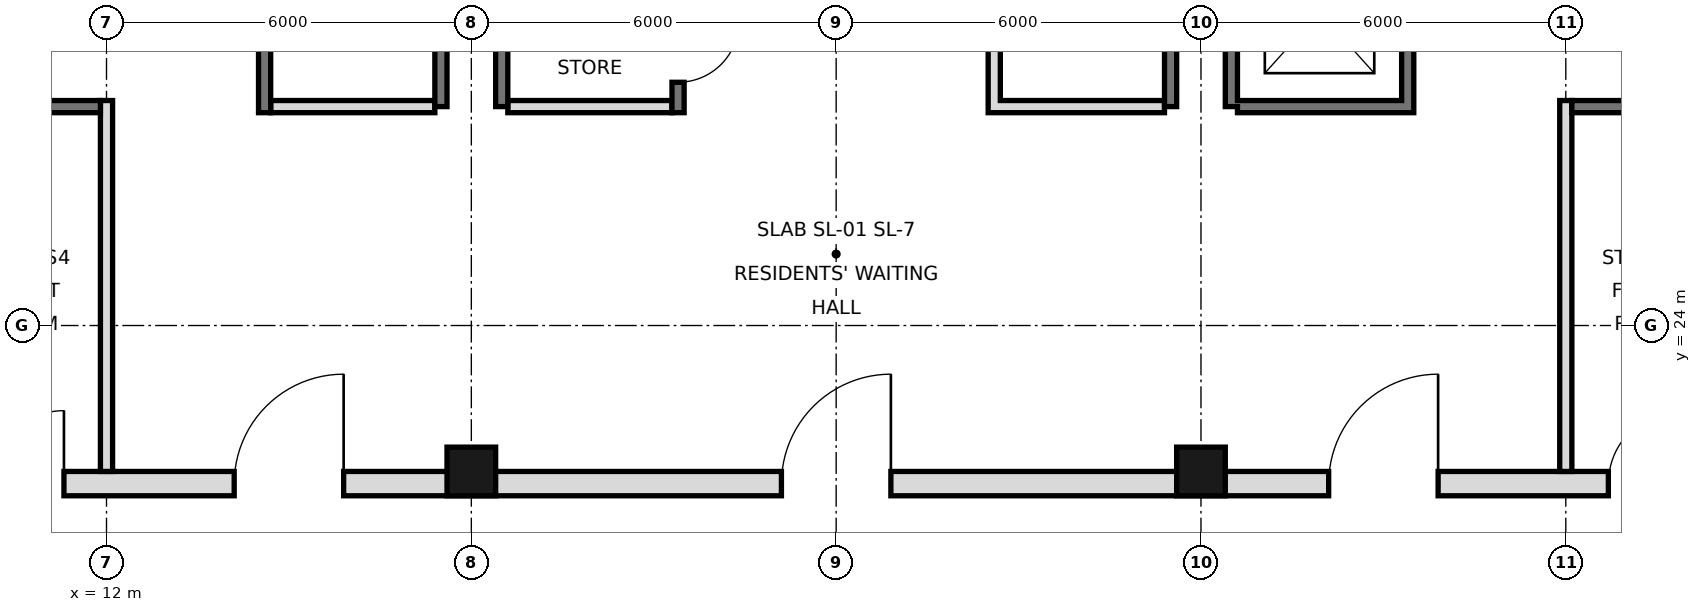
"""IFC4 building model, lengths in metres.
Left out: names, types, materials, properties, quantities, classifications, styles, units other than length and angle.
Written with IfcOpenShell. Run it as: python <this file> out.ifc"""

import sys

from ifc_helpers import new_model, si_unit, direction, frame, frame_2d, origin, origin_2d, place, context, subcontext, project, spatial, rectangle, hollow_rectangle, extrude, element, fill, save


model = new_model("IFC4")
c1 = context("Model", 3, precision=1e-05, world=origin(), true_north=direction((0.0, 1.0)))
c2 = subcontext(c1, "Body", "Model", "MODEL_VIEW")
j1 = project(units=[si_unit("LENGTHUNIT", "METRE"), si_unit("PLANEANGLEUNIT", "RADIAN")], contexts=[c1])
p1 = place(None, origin())
s1 = spatial("IfcSite", under=j1, at=p1, CompositionType="ELEMENT")
p2 = place(p1, origin())
s2 = spatial("IfcBuilding", under=s1, at=p2, CompositionType="ELEMENT")
p3 = place(p2, frame((0.0, 0.0, 263.0)))
s3 = spatial("IfcBuildingStorey", under=s2, at=p3, CompositionType="ELEMENT", Elevation=263.0)
for number, where, z_axis, x_axis in (
    (1, (18.0, 21.6, 0.0), (0.0, 0.0, 1.0), (1.0, 0.0, 0.0)),
    (2, (30.0, 21.6, 0.0), (0.0, 0.0, 1.0), (1.0, 0.0, 0.0)),
):
    element("IfcColumn", number, at=place(p3, frame(where, z_axis=z_axis, x_axis=x_axis)), inside=s3, PredefinedType="COLUMN", context=c2, shape_type="SweptSolid", body=[
        extrude(hollow_rectangle(XDim=0.8, YDim=0.8, WallThickness=0.032, at=origin_2d()), origin(), (0.0, 0.0, 1.0), 3.6),
    ])
for number, where, z_axis, x_axis in (
    (3, (17.5, 27.6, 0.0), (0.0, 0.0, 1.0), (0.0, 1.0, 0.0)),
    (4, (18.5, 27.6, 0.0), (0.0, 0.0, 1.0), (0.0, 1.0, 0.0)),
    (5, (29.5, 27.6, 0.0), (0.0, 0.0, 1.0), (0.0, 1.0, 0.0)),
    (6, (30.5, 27.6, 0.0), (0.0, 0.0, 1.0), (0.0, 1.0, 0.0)),
):
    element("IfcWall", number, at=place(p3, frame(where, z_axis=z_axis, x_axis=x_axis)), inside=s3, PredefinedType="SOLIDWALL", context=c2, shape_type="SweptSolid", body=[
        extrude(rectangle(XDim=17.5, YDim=0.2, at=frame_2d((8.75, 0.0))), origin(), (0.0, 0.0, 1.0), 3.42),
    ])
p4 = place(p3, frame((5.6, 21.4, 0.0), z_axis=(0.0, 0.0, 1.0), x_axis=(1.0, 0.0, 0.0)))
e7 = element("IfcWall", 7, at=p4, inside=s3, PredefinedType="SOLIDWALL", context=c2, shape_type="SweptSolid", body=[
    extrude(rectangle(XDim=36.8, YDim=0.4, at=frame_2d((18.4, 0.0))), origin(), (0.0, 0.0, 1.0), 3.42),
])
p5 = place(p4, frame((8.5, 0.0, 0.0)))
e8 = element("IfcOpeningElement", 8, at=p5, cuts=e7, PredefinedType="OPENING", context=c2, shape_type="SweptSolid", body=[
    extrude(rectangle(XDim=1.8, YDim=2.1, at=frame_2d((0.9, 1.05))), frame((0.0, 0.21, 0.0), z_axis=(0.0, -1.0, 0.0), x_axis=(1.0, 0.0, 0.0)), (0.0, 0.0, 1.0), 0.42),
])
p6 = place(p4, frame((17.5, 0.0, 0.0)))
e9 = element("IfcOpeningElement", 9, at=p6, cuts=e7, PredefinedType="OPENING", context=c2, shape_type="SweptSolid", body=[
    extrude(rectangle(XDim=1.8, YDim=2.1, at=frame_2d((0.9, 1.05))), frame((0.0, 0.21, 0.0), z_axis=(0.0, -1.0, 0.0), x_axis=(1.0, 0.0, 0.0)), (0.0, 0.0, 1.0), 0.42),
])
p7 = place(p4, frame((26.5, 0.0, 0.0)))
e10 = element("IfcOpeningElement", 10, at=p7, cuts=e7, PredefinedType="OPENING", context=c2, shape_type="SweptSolid", body=[
    extrude(rectangle(XDim=1.8, YDim=2.1, at=frame_2d((0.9, 1.05))), frame((0.0, 0.21, 0.0), z_axis=(0.0, -1.0, 0.0), x_axis=(1.0, 0.0, 0.0)), (0.0, 0.0, 1.0), 0.42),
])
p8 = place(p4, frame((4.5, 0.0, 0.0)))
e11 = element("IfcOpeningElement", 11, at=p8, cuts=e7, PredefinedType="OPENING", context=c2, shape_type="SweptSolid", body=[
    extrude(rectangle(XDim=1.2, YDim=2.1, at=frame_2d((0.6, 1.05))), frame((0.0, 0.21, 0.0), z_axis=(0.0, -1.0, 0.0), x_axis=(1.0, 0.0, 0.0)), (0.0, 0.0, 1.0), 0.42),
])
p9 = place(p4, frame((31.1, 0.0, 0.0)))
e12 = element("IfcOpeningElement", 12, at=p9, cuts=e7, PredefinedType="OPENING", context=c2, shape_type="SweptSolid", body=[
    extrude(rectangle(XDim=1.2, YDim=2.1, at=frame_2d((0.6, 1.05))), frame((0.0, 0.21, 0.0), z_axis=(0.0, -1.0, 0.0), x_axis=(1.0, 0.0, 0.0)), (0.0, 0.0, 1.0), 0.42),
])
p10 = place(p3, frame((12.0, 21.6, 0.0), z_axis=(0.0, 0.0, 1.0), x_axis=(0.0, 1.0, 0.0)))
e13 = element("IfcWall", 13, at=p10, inside=s3, PredefinedType="PARTITIONING", context=c2, shape_type="SweptSolid", body=[
    extrude(rectangle(XDim=6.1, YDim=0.2, at=frame_2d((3.05, 0.0))), origin(), (0.0, 0.0, 1.0), 3.42),
])
p11 = place(p3, frame((14.6, 27.5, 0.0), z_axis=(0.0, 0.0, 1.0), x_axis=(0.0, 1.0, 0.0)))
e14 = element("IfcWall", 14, at=p11, inside=s3, PredefinedType="SOLIDWALL", context=c2, shape_type="SweptSolid", body=[
    extrude(rectangle(XDim=17.5, YDim=0.2, at=frame_2d((8.75, 0.0))), origin(), (0.0, 0.0, 1.0), 3.42),
])
p12 = place(p11, frame((15.4, 0.0, 0.0)))
e15 = element("IfcOpeningElement", 15, at=p12, cuts=e14, PredefinedType="OPENING", context=c2, shape_type="SweptSolid", body=[
    extrude(rectangle(XDim=1.1, YDim=2.1, at=frame_2d((0.55, 1.05))), frame((0.0, 0.11, 0.0), z_axis=(0.0, -1.0, 0.0), x_axis=(1.0, 0.0, 0.0)), (0.0, 0.0, 1.0), 0.22),
])
p13 = place(p11, frame((2.7, 0.0, 0.0)))
e16 = element("IfcOpeningElement", 16, at=p13, cuts=e14, PredefinedType="OPENING", context=c2, shape_type="SweptSolid", body=[
    extrude(rectangle(XDim=1.0, YDim=2.1, at=frame_2d((0.5, 1.05))), frame((0.0, 0.11, 0.0), z_axis=(0.0, -1.0, 0.0), x_axis=(1.0, 0.0, 0.0)), (0.0, 0.0, 1.0), 0.22),
])
p14 = place(p11, frame((9.9, 0.0, 0.0)))
e17 = element("IfcOpeningElement", 17, at=p14, cuts=e14, PredefinedType="OPENING", context=c2, shape_type="SweptSolid", body=[
    extrude(rectangle(XDim=0.9, YDim=2.1, at=frame_2d((0.45, 1.05))), frame((0.0, 0.11, 0.0), z_axis=(0.0, -1.0, 0.0), x_axis=(1.0, 0.0, 0.0)), (0.0, 0.0, 1.0), 0.22),
])
p15 = place(p3, frame((21.4, 27.5, 0.0), z_axis=(0.0, 0.0, 1.0), x_axis=(0.0, 1.0, 0.0)))
e18 = element("IfcWall", 18, at=p15, inside=s3, PredefinedType="SOLIDWALL", context=c2, shape_type="SweptSolid", body=[
    extrude(rectangle(XDim=17.5, YDim=0.2, at=frame_2d((8.75, 0.0))), origin(), (0.0, 0.0, 1.0), 3.42),
])
p16 = place(p15, frame((0.5, 0.0, 0.0)))
e19 = element("IfcOpeningElement", 19, at=p16, cuts=e18, PredefinedType="OPENING", context=c2, shape_type="SweptSolid", body=[
    extrude(rectangle(XDim=1.0, YDim=2.1, at=frame_2d((0.5, 1.05))), frame((0.0, 0.11, 0.0), z_axis=(0.0, -1.0, 0.0), x_axis=(1.0, 0.0, 0.0)), (0.0, 0.0, 1.0), 0.22),
])
p17 = place(p15, frame((3.6, 0.0, 0.0)))
e20 = element("IfcOpeningElement", 20, at=p17, cuts=e18, PredefinedType="OPENING", context=c2, shape_type="SweptSolid", body=[
    extrude(rectangle(XDim=1.0, YDim=2.1, at=frame_2d((0.5, 1.05))), frame((0.0, 0.11, 0.0), z_axis=(0.0, -1.0, 0.0), x_axis=(1.0, 0.0, 0.0)), (0.0, 0.0, 1.0), 0.22),
])
p18 = place(p15, frame((9.8, 0.0, 0.0)))
e21 = element("IfcOpeningElement", 21, at=p18, cuts=e18, PredefinedType="OPENING", context=c2, shape_type="SweptSolid", body=[
    extrude(rectangle(XDim=1.0, YDim=2.1, at=frame_2d((0.5, 1.05))), frame((0.0, 0.11, 0.0), z_axis=(0.0, -1.0, 0.0), x_axis=(1.0, 0.0, 0.0)), (0.0, 0.0, 1.0), 0.22),
])
p19 = place(p15, frame((7.4, 0.0, 0.0)))
e22 = element("IfcOpeningElement", 22, at=p19, cuts=e18, PredefinedType="OPENING", context=c2, shape_type="SweptSolid", body=[
    extrude(rectangle(XDim=0.9, YDim=2.1, at=frame_2d((0.45, 1.05))), frame((0.0, 0.11, 0.0), z_axis=(0.0, -1.0, 0.0), x_axis=(1.0, 0.0, 0.0)), (0.0, 0.0, 1.0), 0.22),
])
p20 = place(p3, frame((26.6, 27.5, 0.0), z_axis=(0.0, 0.0, 1.0), x_axis=(0.0, 1.0, 0.0)))
e23 = element("IfcWall", 23, at=p20, inside=s3, PredefinedType="SOLIDWALL", context=c2, shape_type="SweptSolid", body=[
    extrude(rectangle(XDim=17.5, YDim=0.2, at=frame_2d((8.75, 0.0))), origin(), (0.0, 0.0, 1.0), 3.42),
])
p21 = place(p20, frame((4.3, 0.0, 0.0)))
e24 = element("IfcOpeningElement", 24, at=p21, cuts=e23, PredefinedType="OPENING", context=c2, shape_type="SweptSolid", body=[
    extrude(rectangle(XDim=0.9, YDim=2.1, at=frame_2d((0.45, 1.05))), frame((0.0, 0.11, 0.0), z_axis=(0.0, -1.0, 0.0), x_axis=(1.0, 0.0, 0.0)), (0.0, 0.0, 1.0), 0.22),
])
p22 = place(p20, frame((10.35, 0.0, 0.0)))
e25 = element("IfcOpeningElement", 25, at=p22, cuts=e23, PredefinedType="OPENING", context=c2, shape_type="SweptSolid", body=[
    extrude(rectangle(XDim=1.0, YDim=2.1, at=frame_2d((0.5, 1.05))), frame((0.0, 0.11, 0.0), z_axis=(0.0, -1.0, 0.0), x_axis=(1.0, 0.0, 0.0)), (0.0, 0.0, 1.0), 0.22),
])
p23 = place(p20, frame((14.575, 0.0, 0.0)))
e26 = element("IfcOpeningElement", 26, at=p23, cuts=e23, PredefinedType="OPENING", context=c2, shape_type="SweptSolid", body=[
    extrude(rectangle(XDim=1.0, YDim=2.1, at=frame_2d((0.5, 1.05))), frame((0.0, 0.11, 0.0), z_axis=(0.0, -1.0, 0.0), x_axis=(1.0, 0.0, 0.0)), (0.0, 0.0, 1.0), 0.22),
])
p24 = place(p3, frame((33.4, 27.5, 0.0), z_axis=(0.0, 0.0, 1.0), x_axis=(0.0, 1.0, 0.0)))
e27 = element("IfcWall", 27, at=p24, inside=s3, PredefinedType="SOLIDWALL", context=c2, shape_type="SweptSolid", body=[
    extrude(rectangle(XDim=17.5, YDim=0.2, at=frame_2d((8.75, 0.0))), origin(), (0.0, 0.0, 1.0), 3.42),
])
p25 = place(p24, frame((1.1, 0.0, 0.0)))
e28 = element("IfcOpeningElement", 28, at=p25, cuts=e27, PredefinedType="OPENING", context=c2, shape_type="SweptSolid", body=[
    extrude(rectangle(XDim=1.1, YDim=2.1, at=frame_2d((0.55, 1.05))), frame((0.0, 0.11, 0.0), z_axis=(0.0, -1.0, 0.0), x_axis=(1.0, 0.0, 0.0)), (0.0, 0.0, 1.0), 0.22),
])
p26 = place(p24, frame((4.2, 0.0, 0.0)))
e29 = element("IfcOpeningElement", 29, at=p26, cuts=e27, PredefinedType="OPENING", context=c2, shape_type="SweptSolid", body=[
    extrude(rectangle(XDim=1.1, YDim=2.1, at=frame_2d((0.55, 1.05))), frame((0.0, 0.11, 0.0), z_axis=(0.0, -1.0, 0.0), x_axis=(1.0, 0.0, 0.0)), (0.0, 0.0, 1.0), 0.22),
])
p27 = place(p24, frame((15.4, 0.0, 0.0)))
e30 = element("IfcOpeningElement", 30, at=p27, cuts=e27, PredefinedType="OPENING", context=c2, shape_type="SweptSolid", body=[
    extrude(rectangle(XDim=1.1, YDim=2.1, at=frame_2d((0.55, 1.05))), frame((0.0, 0.11, 0.0), z_axis=(0.0, -1.0, 0.0), x_axis=(1.0, 0.0, 0.0)), (0.0, 0.0, 1.0), 0.22),
])
p28 = place(p24, frame((9.9, 0.0, 0.0)))
e31 = element("IfcOpeningElement", 31, at=p28, cuts=e27, PredefinedType="OPENING", context=c2, shape_type="SweptSolid", body=[
    extrude(rectangle(XDim=0.9, YDim=2.1, at=frame_2d((0.45, 1.05))), frame((0.0, 0.11, 0.0), z_axis=(0.0, -1.0, 0.0), x_axis=(1.0, 0.0, 0.0)), (0.0, 0.0, 1.0), 0.22),
])
p29 = place(p3, frame((36.0, 21.6, 0.0), z_axis=(0.0, 0.0, 1.0), x_axis=(0.0, 1.0, 0.0)))
e32 = element("IfcWall", 32, at=p29, inside=s3, PredefinedType="PARTITIONING", context=c2, shape_type="SweptSolid", body=[
    extrude(rectangle(XDim=6.1, YDim=0.2, at=frame_2d((3.05, 0.0))), origin(), (0.0, 0.0, 1.0), 3.42),
])
for number, where, z_axis, x_axis in (
    (33, (14.7, 27.6, 0.0), (0.0, 0.0, 1.0), (1.0, 0.0, 0.0)),
    (34, (18.6, 27.6, 0.0), (0.0, 0.0, 1.0), (1.0, 0.0, 0.0)),
):
    element("IfcWall", number, at=place(p3, frame(where, z_axis=z_axis, x_axis=x_axis)), inside=s3, PredefinedType="PARTITIONING", context=c2, shape_type="SweptSolid", body=[
        extrude(rectangle(XDim=2.7, YDim=0.2, at=frame_2d((1.35, 0.0))), origin(), (0.0, 0.0, 1.0), 3.42),
    ])
for number, where, z_axis, x_axis in (
    (35, (26.7, 27.6, 0.0), (0.0, 0.0, 1.0), (1.0, 0.0, 0.0)),
    (36, (30.6, 27.6, 0.0), (0.0, 0.0, 1.0), (1.0, 0.0, 0.0)),
):
    element("IfcWall", number, at=place(p3, frame(where, z_axis=z_axis, x_axis=x_axis)), inside=s3, PredefinedType="SOLIDWALL", context=c2, shape_type="SweptSolid", body=[
        extrude(rectangle(XDim=2.7, YDim=0.2, at=frame_2d((1.35, 0.0))), origin(), (0.0, 0.0, 1.0), 3.42),
    ])
for number, where, z_axis, x_axis in (
    (37, (36.1, 27.6, 0.0), (0.0, 0.0, 1.0), (1.0, 0.0, 0.0)),
    (38, (6.6, 27.6, 0.0), (0.0, 0.0, 1.0), (1.0, 0.0, 0.0)),
):
    element("IfcWall", number, at=place(p3, frame(where, z_axis=z_axis, x_axis=x_axis)), inside=s3, PredefinedType="SOLIDWALL", context=c2, shape_type="SweptSolid", body=[
        extrude(rectangle(XDim=5.3, YDim=0.2, at=frame_2d((2.65, 0.0))), origin(), (0.0, 0.0, 1.0), 3.42),
    ])
p30 = place(p5, frame((1.8, 0.0, 0.0), z_axis=(0.0, 0.0, 1.0), x_axis=(-1.0, 0.0, 0.0)))
e39 = element("IfcDoor", 39, at=p30, inside=s3, OperationType="SINGLE_SWING_LEFT", PredefinedType="DOOR", context=c2, shape_type="SweptSolid", body=[
    extrude(rectangle(XDim=1.8, YDim=2.1, at=frame_2d((0.9, 1.05))), frame((0.0, 0.025, 0.0), z_axis=(0.0, -1.0, 0.0), x_axis=(1.0, 0.0, 0.0)), (0.0, 0.0, 1.0), 0.05),
])
fill(e8, e39)
p31 = place(p6, frame((1.8, 0.0, 0.0), z_axis=(0.0, 0.0, 1.0), x_axis=(-1.0, 0.0, 0.0)))
e40 = element("IfcDoor", 40, at=p31, inside=s3, OperationType="SINGLE_SWING_LEFT", PredefinedType="DOOR", context=c2, shape_type="SweptSolid", body=[
    extrude(rectangle(XDim=1.8, YDim=2.1, at=frame_2d((0.9, 1.05))), frame((0.0, 0.025, 0.0), z_axis=(0.0, -1.0, 0.0), x_axis=(1.0, 0.0, 0.0)), (0.0, 0.0, 1.0), 0.05),
])
fill(e9, e40)
p32 = place(p7, frame((1.8, 0.0, 0.0), z_axis=(0.0, 0.0, 1.0), x_axis=(-1.0, 0.0, 0.0)))
e41 = element("IfcDoor", 41, at=p32, inside=s3, OperationType="SINGLE_SWING_LEFT", PredefinedType="DOOR", context=c2, shape_type="SweptSolid", body=[
    extrude(rectangle(XDim=1.8, YDim=2.1, at=frame_2d((0.9, 1.05))), frame((0.0, 0.025, 0.0), z_axis=(0.0, -1.0, 0.0), x_axis=(1.0, 0.0, 0.0)), (0.0, 0.0, 1.0), 0.05),
])
fill(e10, e41)
p33 = place(p8, frame((1.2, 0.0, 0.0), z_axis=(0.0, 0.0, 1.0), x_axis=(-1.0, 0.0, 0.0)))
e42 = element("IfcDoor", 42, at=p33, inside=s3, OperationType="SINGLE_SWING_LEFT", PredefinedType="DOOR", context=c2, shape_type="SweptSolid", body=[
    extrude(rectangle(XDim=1.2, YDim=2.1, at=frame_2d((0.6, 1.05))), frame((0.0, 0.025, 0.0), z_axis=(0.0, -1.0, 0.0), x_axis=(1.0, 0.0, 0.0)), (0.0, 0.0, 1.0), 0.05),
])
fill(e11, e42)
p34 = place(p9, frame((1.2, 0.0, 0.0), z_axis=(0.0, 0.0, 1.0), x_axis=(-1.0, 0.0, 0.0)))
e43 = element("IfcDoor", 43, at=p34, inside=s3, OperationType="SINGLE_SWING_LEFT", PredefinedType="DOOR", context=c2, shape_type="SweptSolid", body=[
    extrude(rectangle(XDim=1.2, YDim=2.1, at=frame_2d((0.6, 1.05))), frame((0.0, 0.025, 0.0), z_axis=(0.0, -1.0, 0.0), x_axis=(1.0, 0.0, 0.0)), (0.0, 0.0, 1.0), 0.05),
])
fill(e12, e43)
p35 = place(p16, origin())
e44 = element("IfcDoor", 44, at=p35, inside=s3, OperationType="SINGLE_SWING_RIGHT", PredefinedType="DOOR", context=c2, shape_type="SweptSolid", body=[
    extrude(rectangle(XDim=1.0, YDim=2.1, at=frame_2d((0.5, 1.05))), frame((0.0, 0.025, 0.0), z_axis=(0.0, -1.0, 0.0), x_axis=(1.0, 0.0, 0.0)), (0.0, 0.0, 1.0), 0.05),
])
fill(e19, e44)
save(model, sys.argv[1])
